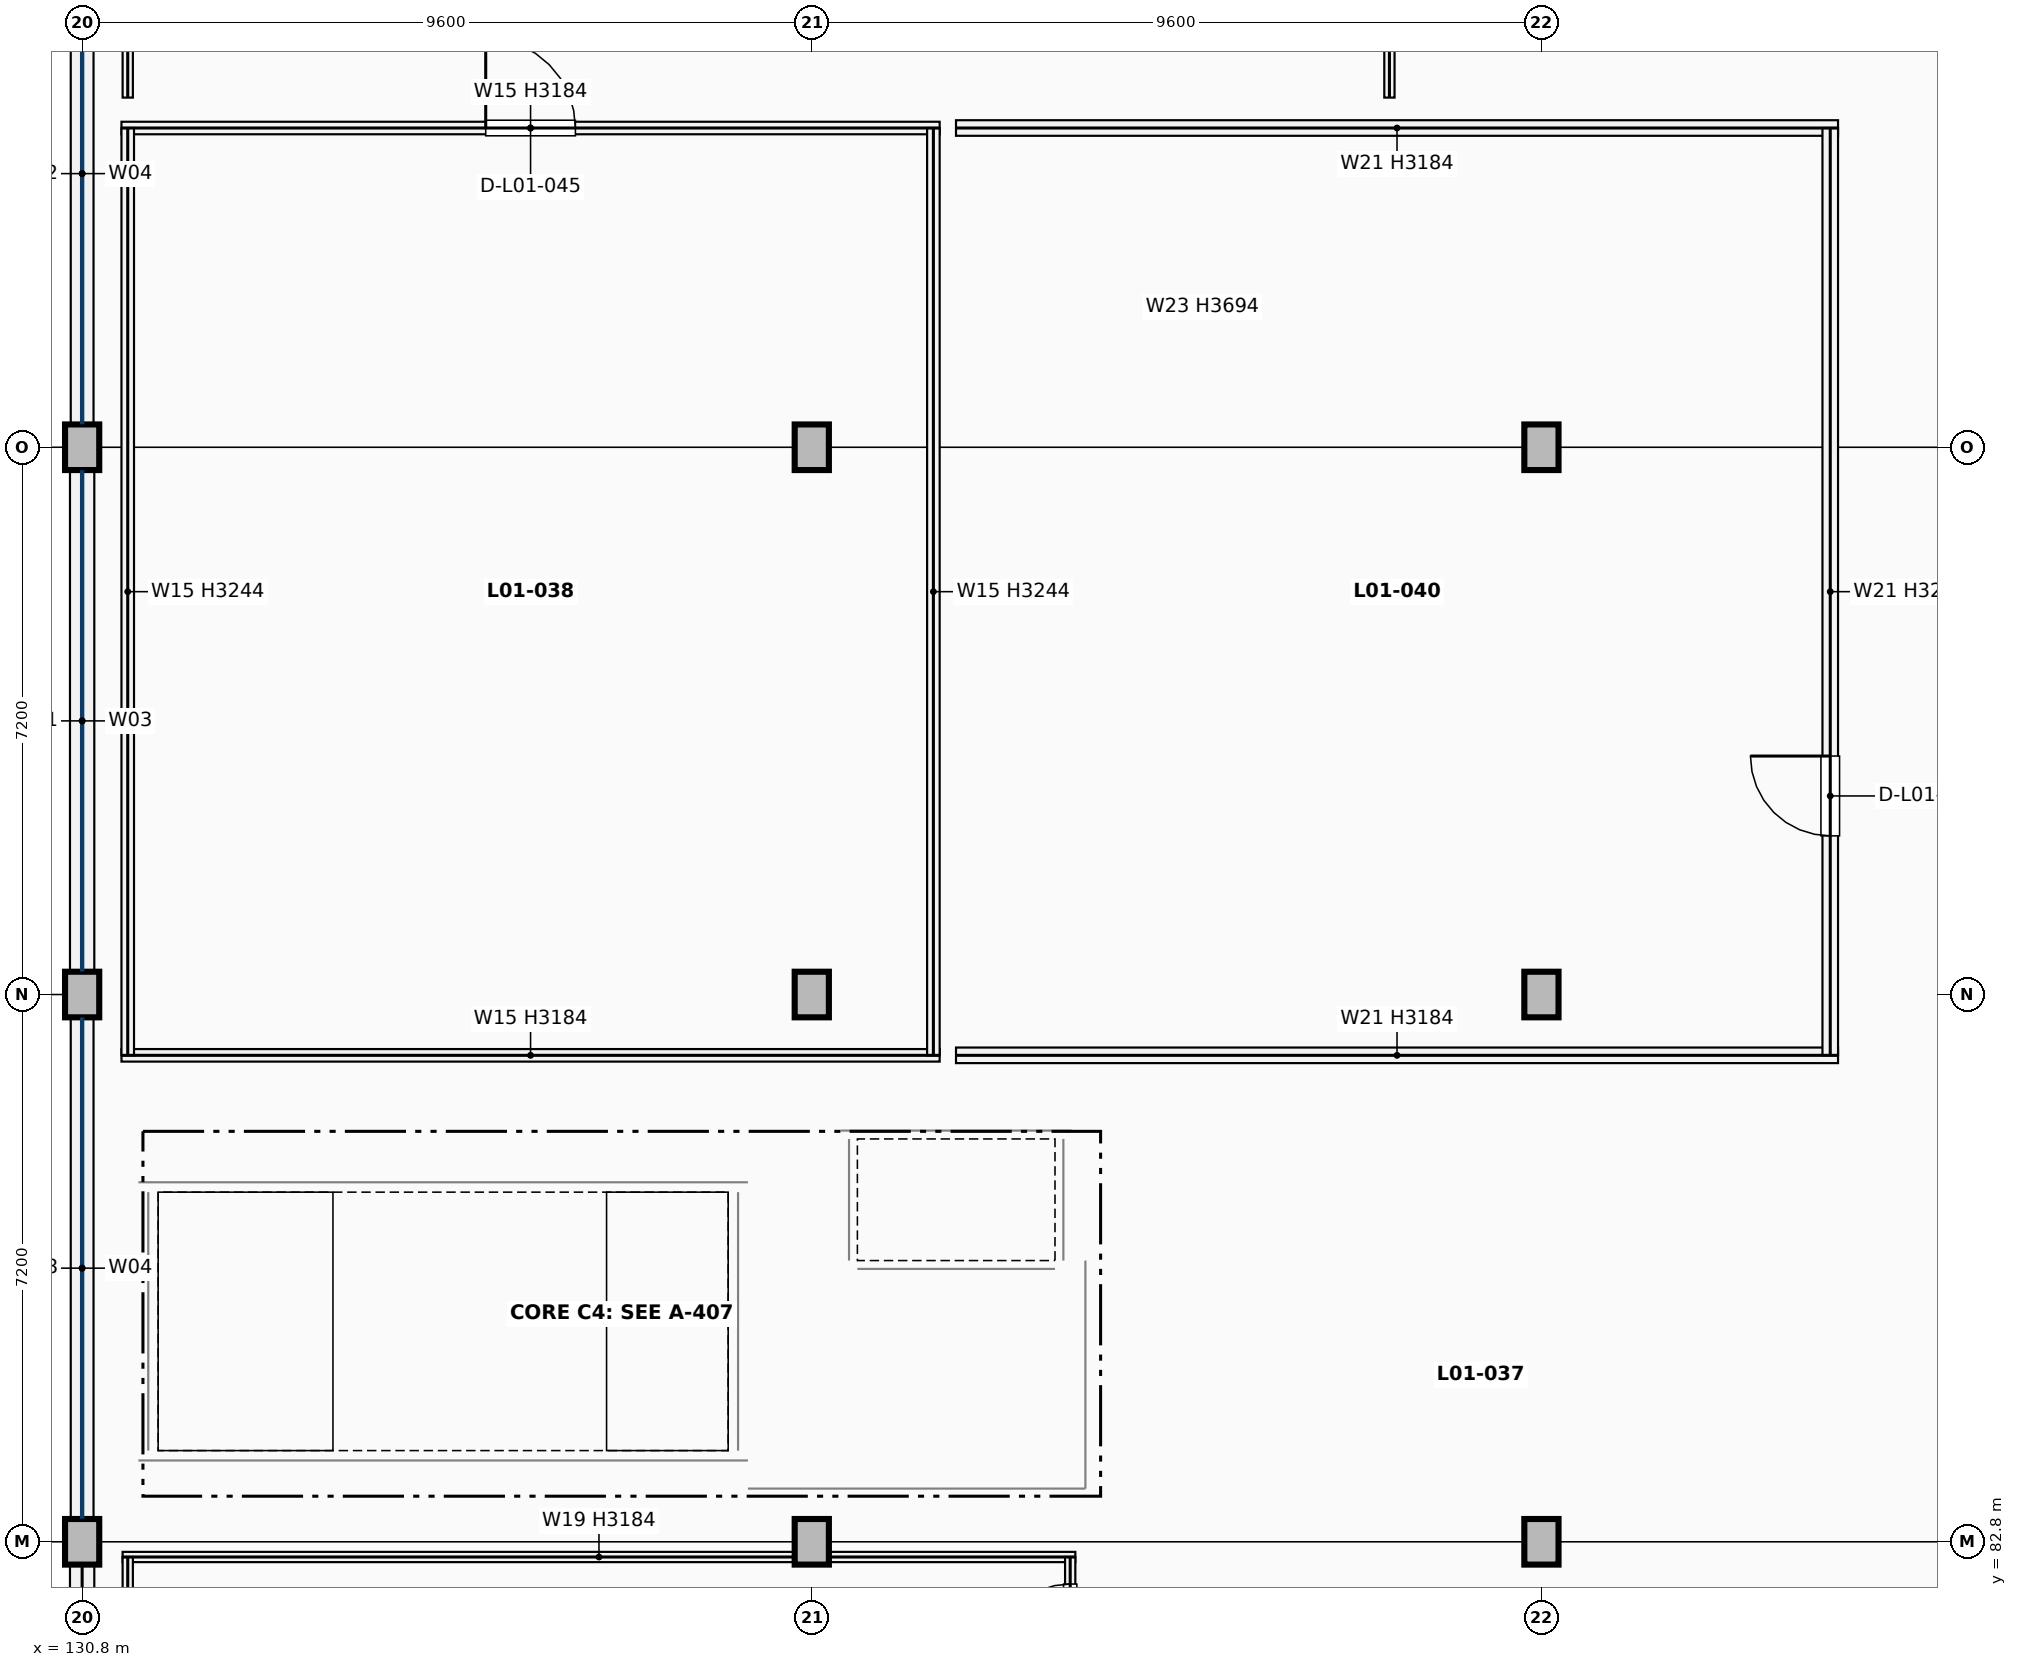
"""IFC4 building model, lengths in metres.
Left out: names, types, materials, properties, quantities, classifications, styles, units other than length and angle.
Written with IfcOpenShell. Run it as: python <this file> out.ifc"""

import sys

from ifc_helpers import new_model, si_unit, direction, frame, frame_2d, origin, origin_2d, place, context, subcontext, project, spatial, rectangle, extrude, element, fill, save


model = new_model("IFC4")
c1 = context("Model", 3, precision=1e-05, world=origin(), true_north=direction((0.0, 1.0)))
c2 = subcontext(c1, "Body", "Model", "MODEL_VIEW")
j1 = project(units=[si_unit("LENGTHUNIT", "METRE"), si_unit("PLANEANGLEUNIT", "RADIAN")], contexts=[c1])
p1 = place(None, origin())
s1 = spatial("IfcSite", under=j1, at=p1, CompositionType="ELEMENT")
p2 = place(p1, origin())
s2 = spatial("IfcBuilding", under=s1, at=p2, CompositionType="ELEMENT")
p3 = place(p2, frame((0.0, 0.0, 5.1)))
s3 = spatial("IfcBuildingStorey", under=s2, at=p3, CompositionType="ELEMENT", Elevation=5.1)
for number, where, z_axis, x_axis in (
    (1, (130.8, 82.8, 0.0), (0.0, 0.0, 1.0), (1.0, 0.0, 0.0)),
    (2, (130.8, 90.0, 0.0), (0.0, 0.0, 1.0), (1.0, 0.0, 0.0)),
    (3, (130.8, 97.2, 0.0), (0.0, 0.0, 1.0), (1.0, 0.0, 0.0)),
    (4, (140.4, 82.8, 0.0), (0.0, 0.0, 1.0), (1.0, 0.0, 0.0)),
    (5, (140.4, 90.0, 0.0), (0.0, 0.0, 1.0), (1.0, 0.0, 0.0)),
    (6, (140.4, 97.2, 0.0), (0.0, 0.0, 1.0), (1.0, 0.0, 0.0)),
    (7, (150.0, 82.8, 0.0), (0.0, 0.0, 1.0), (1.0, 0.0, 0.0)),
    (8, (150.0, 90.0, 0.0), (0.0, 0.0, 1.0), (1.0, 0.0, 0.0)),
    (9, (150.0, 97.2, 0.0), (0.0, 0.0, 1.0), (1.0, 0.0, 0.0)),
):
    element("IfcColumn", number, at=place(p3, frame(where, z_axis=z_axis, x_axis=x_axis)), inside=s3, PredefinedType="COLUMN", context=c2, shape_type="SweptSolid", body=[
        extrude(rectangle(XDim=0.45, YDim=0.6, at=origin_2d()), origin(), (0.0, 0.0, 1.0), 4.42),
    ])
p4 = place(p3, frame((130.8, 79.502, 0.0), z_axis=(0.0, 0.0, 1.0), x_axis=(0.0, 1.0, 0.0)))
e10 = element("IfcWall", 10, at=p4, inside=s3, PredefinedType="SOLIDWALL", context=c2, shape_type="SweptSolid", body=[
    extrude(rectangle(XDim=2.996, YDim=0.32, at=frame_2d((1.498, 0.0))), origin(), (0.0, 0.0, 1.0), 3.244),
])
p5 = place(p3, frame((130.8, 83.102, 0.0), z_axis=(0.0, 0.0, 1.0), x_axis=(0.0, 1.0, 0.0)))
e11 = element("IfcWall", 11, at=p5, inside=s3, PredefinedType="SOLIDWALL", context=c2, shape_type="SweptSolid", body=[
    extrude(rectangle(XDim=6.596, YDim=0.3, at=frame_2d((3.298, 0.0))), origin(), (0.0, 0.0, 1.0), 0.85),
])
p6 = place(p3, frame((130.8, 90.302, 0.0), z_axis=(0.0, 0.0, 1.0), x_axis=(0.0, 1.0, 0.0)))
e12 = element("IfcWall", 12, at=p6, inside=s3, PredefinedType="SOLIDWALL", context=c2, shape_type="SweptSolid", body=[
    extrude(rectangle(XDim=6.596, YDim=0.32, at=frame_2d((3.298, 0.0))), origin(), (0.0, 0.0, 1.0), 0.85),
])
p7 = place(p3, frame((130.8, 97.502, 0.0), z_axis=(0.0, 0.0, 1.0), x_axis=(0.0, 1.0, 0.0)))
e13 = element("IfcWall", 13, at=p7, inside=s3, PredefinedType="SOLIDWALL", context=c2, shape_type="SweptSolid", body=[
    extrude(rectangle(XDim=6.596, YDim=0.3, at=frame_2d((3.298, 0.0))), origin(), (0.0, 0.0, 1.0), 0.85),
])
p8 = place(p3, frame((131.67, 84.0, 0.0), z_axis=(0.0, 0.0, 1.0), x_axis=(0.0, 1.0, 0.0)))
e14 = element("IfcWall", 14, at=p8, inside=s3, PredefinedType="SHEAR", context=c2, shape_type="SweptSolid", body=[
    extrude(rectangle(XDim=3.4, YDim=0.26, at=frame_2d((1.7, 0.0))), origin(), (0.0, 0.0, 1.0), 4.42),
])
for number, where, z_axis, x_axis in (
    (15, (131.54, 83.87, 0.0), (0.0, 0.0, 1.0), (1.0, 0.0, 0.0)),
    (16, (131.54, 87.53, 0.0), (0.0, 0.0, 1.0), (1.0, 0.0, 0.0)),
):
    element("IfcWall", number, at=place(p3, frame(where, z_axis=z_axis, x_axis=x_axis)), inside=s3, PredefinedType="SHEAR", context=c2, shape_type="SweptSolid", body=[
        extrude(rectangle(XDim=8.02, YDim=0.26, at=frame_2d((4.01, 0.0))), origin(), (0.0, 0.0, 1.0), 4.42),
    ])
p9 = place(p3, frame((139.43, 84.0, 0.0), z_axis=(0.0, 0.0, 1.0), x_axis=(0.0, 1.0, 0.0)))
e17 = element("IfcWall", 17, at=p9, inside=s3, PredefinedType="SHEAR", context=c2, shape_type="SweptSolid", body=[
    extrude(rectangle(XDim=3.4, YDim=0.26, at=frame_2d((1.7, 0.0))), origin(), (0.0, 0.0, 1.0), 4.42),
])
p10 = place(p9, frame((0.65, 0.0, 0.0)))
e18 = element("IfcOpeningElement", 18, at=p10, cuts=e17, PredefinedType="OPENING", context=c2, shape_type="SweptSolid", body=[
    extrude(rectangle(XDim=1.2, YDim=2.2, at=frame_2d((0.6, 1.1))), frame((0.0, 0.14, 0.0), z_axis=(0.0, -1.0, 0.0), x_axis=(1.0, 0.0, 0.0)), (0.0, 0.0, 1.0), 0.28),
])
for number, where, z_axis, x_axis in (
    (19, (140.89, 86.5, 0.0), (0.0, 0.0, 1.0), (0.0, 1.0, 0.0)),
    (20, (143.71, 86.5, 0.0), (0.0, 0.0, 1.0), (0.0, 1.0, 0.0)),
):
    element("IfcWall", number, at=place(p3, frame(where, z_axis=z_axis, x_axis=x_axis)), inside=s3, PredefinedType="SHEAR", context=c2, shape_type="SweptSolid", body=[
        extrude(rectangle(XDim=1.6, YDim=0.22, at=frame_2d((0.8, 0.0))), origin(), (0.0, 0.0, 1.0), 4.42),
    ])
p11 = place(p3, frame((140.78, 88.21, 0.0), z_axis=(0.0, 0.0, 1.0), x_axis=(1.0, 0.0, 0.0)))
e21 = element("IfcWall", 21, at=p11, inside=s3, PredefinedType="SHEAR", context=c2, shape_type="SweptSolid", body=[
    extrude(rectangle(XDim=3.04, YDim=0.22, at=frame_2d((1.52, 0.0))), origin(), (0.0, 0.0, 1.0), 4.42),
])
p12 = place(p3, frame((141.0, 86.39, 0.0), z_axis=(0.0, 0.0, 1.0), x_axis=(1.0, 0.0, 0.0)))
e22 = element("IfcWall", 22, at=p12, inside=s3, PredefinedType="SHEAR", context=c2, shape_type="SweptSolid", body=[
    extrude(rectangle(XDim=2.6, YDim=0.22, at=frame_2d((1.3, 0.0))), origin(), (0.0, 0.0, 1.0), 4.42),
])
p13 = place(p12, frame((0.8, 0.0, 0.0)))
e23 = element("IfcOpeningElement", 23, at=p13, cuts=e22, PredefinedType="OPENING", context=c2, shape_type="SweptSolid", body=[
    extrude(rectangle(XDim=1.0, YDim=2.15, at=frame_2d((0.5, 1.075))), frame((0.0, 0.12, 0.0), z_axis=(0.0, -1.0, 0.0), x_axis=(1.0, 0.0, 0.0)), (0.0, 0.0, 1.0), 0.24),
])
p14 = place(p3, frame((144.0, 83.5, 0.0), z_axis=(0.0, 0.0, 1.0), x_axis=(0.0, 1.0, 0.0)))
e24 = element("IfcWall", 24, at=p14, inside=s3, PredefinedType="PARTITIONING", context=c2, shape_type="SweptSolid", body=[
    extrude(rectangle(XDim=3.0, YDim=0.2, at=frame_2d((1.5, 0.0))), origin(), (0.0, 0.0, 1.0), 3.184),
])
p15 = place(p14, frame((0.775, 0.0, 0.0)))
e25 = element("IfcOpeningElement", 25, at=p15, cuts=e24, PredefinedType="OPENING", context=c2, shape_type="SweptSolid", body=[
    extrude(rectangle(XDim=1.45, YDim=2.2, at=frame_2d((0.725, 1.1))), frame((0.0, 0.11, 0.0), z_axis=(0.0, -1.0, 0.0), x_axis=(1.0, 0.0, 0.0)), (0.0, 0.0, 1.0), 0.22),
])
p16 = place(p3, frame((139.56, 83.5, 0.0), z_axis=(0.0, 0.0, 1.0), x_axis=(1.0, 0.0, 0.0)))
e26 = element("IfcWall", 26, at=p16, inside=s3, PredefinedType="PARTITIONING", context=c2, shape_type="SweptSolid", body=[
    extrude(rectangle(XDim=4.44, YDim=0.2, at=frame_2d((2.22, 0.0))), origin(), (0.0, 0.0, 1.0), 3.184),
])
p17 = place(p3, frame((131.317, 89.2, 0.0), z_axis=(0.0, 0.0, 1.0), x_axis=(1.0, 0.0, 0.0)))
e27 = element("IfcWall", 27, at=p17, inside=s3, PredefinedType="PARTITIONING", context=c2, shape_type="SweptSolid", body=[
    extrude(rectangle(XDim=10.765, YDim=0.165, at=frame_2d((5.383, 0.0))), origin(), (0.0, 0.0, 1.0), 3.184),
])
p18 = place(p3, frame((131.317, 101.4, 0.0), z_axis=(0.0, 0.0, 1.0), x_axis=(1.0, 0.0, 0.0)))
e28 = element("IfcWall", 28, at=p18, inside=s3, PredefinedType="PARTITIONING", context=c2, shape_type="SweptSolid", body=[
    extrude(rectangle(XDim=10.765, YDim=0.165, at=frame_2d((5.383, 0.0))), origin(), (0.0, 0.0, 1.0), 3.184),
])
p19 = place(p18, frame((4.792, 0.0, 0.0)))
e29 = element("IfcOpeningElement", 29, at=p19, cuts=e28, PredefinedType="OPENING", context=c2, shape_type="SweptSolid", body=[
    extrude(rectangle(XDim=1.18, YDim=2.14, at=frame_2d((0.59, 1.07))), frame((0.0, 0.093, 0.0), z_axis=(0.0, -1.0, 0.0), x_axis=(1.0, 0.0, 0.0)), (0.0, 0.0, 1.0), 0.185),
])
for number, where, z_axis, x_axis in (
    (30, (131.4, 89.2, 0.0), (0.0, 0.0, 1.0), (0.0, 1.0, 0.0)),
    (31, (142.0, 89.2, 0.0), (0.0, 0.0, 1.0), (0.0, 1.0, 0.0)),
):
    element("IfcWall", number, at=place(p3, frame(where, z_axis=z_axis, x_axis=x_axis)), inside=s3, PredefinedType="PARTITIONING", context=c2, shape_type="SweptSolid", body=[
        extrude(rectangle(XDim=12.2, YDim=0.165, at=frame_2d((6.1, 0.0))), origin(), (0.0, 0.0, 1.0), 3.244),
    ])
p20 = place(p3, frame((131.4, 101.8, 0.0), z_axis=(0.0, 0.0, 1.0), x_axis=(0.0, 1.0, 0.0)))
e32 = element("IfcWall", 32, at=p20, inside=s3, PredefinedType="PARTITIONING", context=c2, shape_type="SweptSolid", body=[
    extrude(rectangle(XDim=11.8, YDim=0.135, at=frame_2d((5.9, 0.0))), origin(), (0.0, 0.0, 1.0), 3.244),
])
p21 = place(p20, frame((7.685, 0.0, 0.0)))
e33 = element("IfcOpeningElement", 33, at=p21, cuts=e32, PredefinedType="OPENING", context=c2, shape_type="SweptSolid", body=[
    extrude(rectangle(XDim=1.42, YDim=2.26, at=frame_2d((0.71, 1.13))), frame((0.0, 0.078, 0.0), z_axis=(0.0, -1.0, 0.0), x_axis=(1.0, 0.0, 0.0)), (0.0, 0.0, 1.0), 0.155),
])
p22 = place(p3, frame((148.0, 101.8, 0.0), z_axis=(0.0, 0.0, 1.0), x_axis=(0.0, 1.0, 0.0)))
e34 = element("IfcWall", 34, at=p22, inside=s3, PredefinedType="PARTITIONING", context=c2, shape_type="SweptSolid", body=[
    extrude(rectangle(XDim=11.8, YDim=0.135, at=frame_2d((5.9, 0.0))), origin(), (0.0, 0.0, 1.0), 3.244),
])
for number, where, z_axis, x_axis in (
    (35, (142.298, 89.2, 0.0), (0.0, 0.0, 1.0), (1.0, 0.0, 0.0)),
    (36, (142.298, 101.4, 0.0), (0.0, 0.0, 1.0), (1.0, 0.0, 0.0)),
):
    element("IfcWall", number, at=place(p3, frame(where, z_axis=z_axis, x_axis=x_axis)), inside=s3, PredefinedType="PARTITIONING", context=c2, shape_type="SweptSolid", body=[
        extrude(rectangle(XDim=11.605, YDim=0.205, at=frame_2d((5.802, 0.0))), origin(), (0.0, 0.0, 1.0), 3.184),
    ])
p23 = place(p3, frame((153.8, 89.2, 0.0), z_axis=(0.0, 0.0, 1.0), x_axis=(0.0, 1.0, 0.0)))
e37 = element("IfcWall", 37, at=p23, inside=s3, PredefinedType="PARTITIONING", context=c2, shape_type="SweptSolid", body=[
    extrude(rectangle(XDim=12.2, YDim=0.205, at=frame_2d((6.1, 0.0))), origin(), (0.0, 0.0, 1.0), 3.244),
])
p24 = place(p23, frame((2.887, 0.0, 0.0)))
e38 = element("IfcOpeningElement", 38, at=p24, cuts=e37, PredefinedType="OPENING", context=c2, shape_type="SweptSolid", body=[
    extrude(rectangle(XDim=1.05, YDim=2.15, at=frame_2d((0.525, 1.075))), frame((0.0, 0.113, 0.0), z_axis=(0.0, -1.0, 0.0), x_axis=(1.0, 0.0, 0.0)), (0.0, 0.0, 1.0), 0.225),
])
p25 = place(p3, frame((131.333, 82.6, 0.0), z_axis=(0.0, 0.0, 1.0), x_axis=(1.0, 0.0, 0.0)))
e39 = element("IfcWall", 39, at=p25, inside=s3, PredefinedType="PARTITIONING", context=c2, shape_type="SweptSolid", body=[
    extrude(rectangle(XDim=12.535, YDim=0.135, at=frame_2d((6.268, 0.0))), origin(), (0.0, 0.0, 1.0), 3.184),
])
p26 = place(p3, frame((131.4, 79.6, 0.0), z_axis=(0.0, 0.0, 1.0), x_axis=(0.0, 1.0, 0.0)))
e40 = element("IfcWall", 40, at=p26, inside=s3, PredefinedType="PARTITIONING", context=c2, shape_type="SweptSolid", body=[
    extrude(rectangle(XDim=3.0, YDim=0.135, at=frame_2d((1.5, 0.0))), origin(), (0.0, 0.0, 1.0), 3.244),
])
p27 = place(p3, frame((143.8, 79.6, 0.0), z_axis=(0.0, 0.0, 1.0), x_axis=(0.0, 1.0, 0.0)))
e41 = element("IfcWall", 41, at=p27, inside=s3, PredefinedType="PARTITIONING", context=c2, shape_type="SweptSolid", body=[
    extrude(rectangle(XDim=3.0, YDim=0.135, at=frame_2d((1.5, 0.0))), origin(), (0.0, 0.0, 1.0), 3.244),
])
p28 = place(p27, frame((1.604, 0.0, 0.0)))
e42 = element("IfcOpeningElement", 42, at=p28, cuts=e41, PredefinedType="OPENING", context=c2, shape_type="SweptSolid", body=[
    extrude(rectangle(XDim=1.04, YDim=2.12, at=frame_2d((0.52, 1.06))), frame((0.0, 0.078, 0.0), z_axis=(0.0, -1.0, 0.0), x_axis=(1.0, 0.0, 0.0)), (0.0, 0.0, 1.0), 0.155),
])
p29 = place(p10, origin())
e43 = element("IfcDoor", 43, at=p29, inside=s3, OperationType="SINGLE_SWING_RIGHT", PredefinedType="DOOR", context=c2, shape_type="SweptSolid", body=[
    extrude(rectangle(XDim=1.2, YDim=2.2, at=frame_2d((0.6, 1.1))), frame((0.0, 0.025, 0.0), z_axis=(0.0, -1.0, 0.0), x_axis=(1.0, 0.0, 0.0)), (0.0, 0.0, 1.0), 0.05),
])
fill(e18, e43)
p30 = place(p13, origin())
e44 = element("IfcDoor", 44, at=p30, inside=s3, OperationType="DOUBLE_DOOR_SLIDING", PredefinedType="DOOR", context=c2, shape_type="SweptSolid", body=[
    extrude(rectangle(XDim=1.0, YDim=2.15, at=frame_2d((0.5, 1.075))), frame((0.0, 0.025, 0.0), z_axis=(0.0, -1.0, 0.0), x_axis=(1.0, 0.0, 0.0)), (0.0, 0.0, 1.0), 0.05),
])
fill(e23, e44)
p31 = place(p15, frame((1.45, 0.0, 0.0), z_axis=(0.0, 0.0, 1.0), x_axis=(-1.0, 0.0, 0.0)))
e45 = element("IfcDoor", 45, at=p31, inside=s3, OperationType="DOUBLE_DOOR_SINGLE_SWING", PredefinedType="DOOR", context=c2, shape_type="SweptSolid", body=[
    extrude(rectangle(XDim=1.45, YDim=2.2, at=frame_2d((0.725, 1.1))), frame((0.0, 0.025, 0.0), z_axis=(0.0, -1.0, 0.0), x_axis=(1.0, 0.0, 0.0)), (0.0, 0.0, 1.0), 0.05),
])
fill(e25, e45)
p32 = place(p19, origin())
e46 = element("IfcDoor", 46, at=p32, inside=s3, OperationType="SINGLE_SWING_LEFT", PredefinedType="DOOR", context=c2, shape_type="SweptSolid", body=[
    extrude(rectangle(XDim=1.18, YDim=2.14, at=frame_2d((0.59, 1.07))), frame((0.0, 0.025, 0.0), z_axis=(0.0, -1.0, 0.0), x_axis=(1.0, 0.0, 0.0)), (0.0, 0.0, 1.0), 0.05),
])
fill(e29, e46)
p33 = place(p24, origin())
e47 = element("IfcDoor", 47, at=p33, inside=s3, OperationType="SINGLE_SWING_RIGHT", PredefinedType="DOOR", context=c2, shape_type="SweptSolid", body=[
    extrude(rectangle(XDim=1.05, YDim=2.15, at=frame_2d((0.525, 1.075))), frame((0.0, 0.025, 0.0), z_axis=(0.0, -1.0, 0.0), x_axis=(1.0, 0.0, 0.0)), (0.0, 0.0, 1.0), 0.05),
])
fill(e38, e47)
p34 = place(p28, origin())
e48 = element("IfcDoor", 48, at=p34, inside=s3, OperationType="SINGLE_SWING_LEFT", PredefinedType="DOOR", context=c2, shape_type="SweptSolid", body=[
    extrude(rectangle(XDim=1.04, YDim=2.12, at=frame_2d((0.52, 1.06))), frame((0.0, 0.025, 0.0), z_axis=(0.0, -1.0, 0.0), x_axis=(1.0, 0.0, 0.0)), (0.0, 0.0, 1.0), 0.05),
])
fill(e42, e48)
save(model, sys.argv[1])
